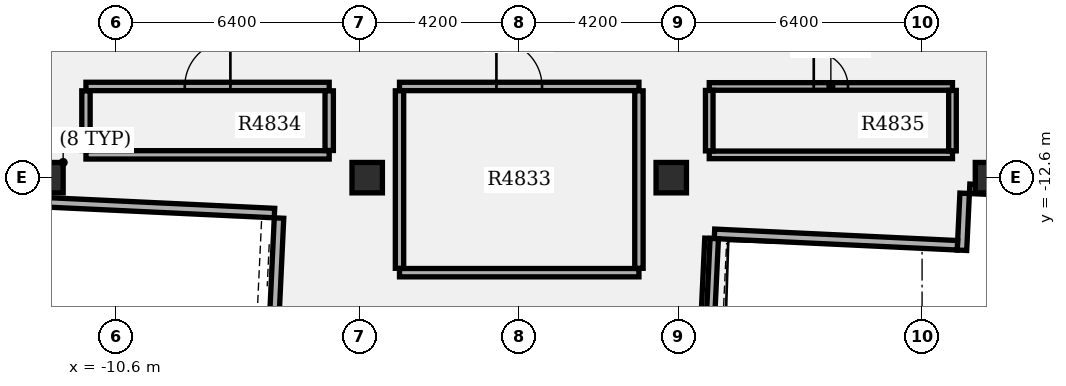
"""IFC4 building model, lengths in metres.
Left out: names, types, materials, properties, quantities, classifications, styles, units other than length and angle.
Written with IfcOpenShell. Run it as: python <this file> out.ifc"""

import sys

from ifc_helpers import new_model, si_unit, direction, frame, frame_2d, origin, origin_2d, place, context, subcontext, project, spatial, rectangle, extrude, element, fill, save


model = new_model("IFC4")
c1 = context("Model", 3, precision=1e-05, world=origin(), true_north=direction((0.0, 1.0)))
c2 = subcontext(c1, "Body", "Model", "MODEL_VIEW")
j1 = project(units=[si_unit("LENGTHUNIT", "METRE"), si_unit("PLANEANGLEUNIT", "RADIAN")], contexts=[c1])
p1 = place(None, origin())
s1 = spatial("IfcSite", under=j1, at=p1, CompositionType="ELEMENT")
p2 = place(p1, origin())
s2 = spatial("IfcBuilding", under=s1, at=p2, CompositionType="ELEMENT")
p3 = place(p2, frame((0.0, 0.0, 321.9)))
s3 = spatial("IfcBuildingStorey", under=s2, at=p3, CompositionType="ELEMENT", Elevation=321.9)
for number, where, z_axis, x_axis in (
    (1, (-12.4, -12.6, 0.0), (0.0, 0.0, 1.0), (1.0, 0.0, 0.0)),
    (2, (12.4, -12.6, 0.0), (0.0, 0.0, 1.0), (1.0, 0.0, 0.0)),
    (3, (-4.0, -12.6, 0.0), (0.0, 0.0, 1.0), (1.0, 0.0, 0.0)),
    (4, (4.0, -12.6, 0.0), (0.0, 0.0, 1.0), (1.0, 0.0, 0.0)),
):
    element("IfcColumn", number, at=place(p3, frame(where, z_axis=z_axis, x_axis=x_axis)), inside=s3, PredefinedType="COLUMN", context=c2, shape_type="SweptSolid", body=[
        extrude(rectangle(XDim=0.8, YDim=0.8, at=origin_2d()), origin(), (0.0, 0.0, 1.0), 5.2),
    ])
for number, where, z_axis, x_axis in (
    (5, (-6.321, -13.662, 0.0), (0.0, 0.0, 1.0), (-0.047, -0.999, 0.0)),
    (6, (4.889, -16.704, 0.0), (0.0, 0.0, 1.0), (0.047, 0.999, 0.0)),
):
    element("IfcWall", number, at=place(p3, frame(where, z_axis=z_axis, x_axis=x_axis)), inside=s3, PredefinedType="STANDARD", context=c2, shape_type="SweptSolid", body=[
        extrude(rectangle(XDim=2.51, YDim=0.25, at=frame_2d((1.255, 0.0))), origin(), (0.0, 0.0, 1.0), 3.6),
    ])
p4 = place(p3, frame((-12.833, -13.23, 0.0), z_axis=(0.0, 0.0, 1.0), x_axis=(0.998889611537, -0.04711203629, 0.0)))
e7 = element("IfcWall", 7, at=p4, inside=s3, PredefinedType="STANDARD", context=c2, shape_type="SweptSolid", body=[
    extrude(rectangle(XDim=6.4, YDim=0.25, at=frame_2d((3.2, 0.0))), origin(), (0.0, 0.0, 1.0), 3.6),
])
p5 = place(p3, frame((13.099, -12.951, 0.0), z_axis=(0.0, 0.0, 1.0), x_axis=(-0.99889143794, 0.047073296156, 0.0)))
e8 = element("IfcWall", 8, at=p5, inside=s3, PredefinedType="STANDARD", context=c2, shape_type="SweptSolid", body=[
    extrude(rectangle(XDim=1.25, YDim=0.25, at=frame_2d((0.625, 0.0))), origin(), (0.0, 0.0, 1.0), 3.6),
])
p6 = place(p3, frame((11.72, -13.011, 0.0), z_axis=(0.0, 0.0, 1.0), x_axis=(-0.047194015166, -0.99888574168, 0.0)))
e9 = element("IfcWall", 9, at=p6, inside=s3, PredefinedType="STANDARD", context=c2, shape_type="SweptSolid", body=[
    extrude(rectangle(XDim=1.5, YDim=0.25, at=frame_2d((0.75, 0.0))), origin(), (0.0, 0.0, 1.0), 3.6),
])
p7 = place(p3, frame((11.531, -14.379, 0.0), z_axis=(0.0, 0.0, 1.0), x_axis=(-0.998889611537, 0.04711203629, 0.0)))
e10 = element("IfcWall", 10, at=p7, inside=s3, PredefinedType="STANDARD", context=c2, shape_type="SweptSolid", body=[
    extrude(rectangle(XDim=6.4, YDim=0.25, at=frame_2d((3.2, 0.0))), origin(), (0.0, 0.0, 1.0), 3.6),
])
p8 = place(p3, frame((5.002, -16.959, 5.2), z_axis=(0.0, 0.0, 1.0), x_axis=(0.047056642383, 0.998892222618, 0.0)))
e11 = element("IfcWall", 11, at=p8, inside=s3, PredefinedType="PARAPET", context=c2, shape_type="SweptSolid", body=[
    extrude(rectangle(XDim=2.76, YDim=0.22, at=frame_2d((1.38, 0.0))), origin(), (0.0, 0.0, 1.0), 1.1),
])
p9 = place(p3, frame((-3.15, -15.1, 0.0), z_axis=(0.0, 0.0, 1.0), x_axis=(1.0, 0.0, 0.0)))
e12 = element("IfcWall", 12, at=p9, inside=s3, PredefinedType="PARTITIONING", context=c2, shape_type="SweptSolid", body=[
    extrude(rectangle(XDim=6.3, YDim=0.22, at=frame_2d((3.15, 0.0))), origin(), (0.0, 0.0, 1.0), 3.59),
])
p10 = place(p3, frame((-3.15, -10.2, 0.0), z_axis=(0.0, 0.0, 1.0), x_axis=(1.0, 0.0, 0.0)))
e13 = element("IfcWall", 13, at=p10, inside=s3, PredefinedType="PARTITIONING", context=c2, shape_type="SweptSolid", body=[
    extrude(rectangle(XDim=6.3, YDim=0.22, at=frame_2d((3.15, 0.0))), origin(), (0.0, 0.0, 1.0), 3.59),
])
p11 = place(p10, frame((2.55, 0.0, 0.0)))
e14 = element("IfcOpeningElement", 14, at=p11, cuts=e13, PredefinedType="OPENING", context=c2, shape_type="SweptSolid", body=[
    extrude(rectangle(XDim=1.2, YDim=2.15, at=frame_2d((0.6, 1.075))), frame((0.0, 0.12, 0.0), z_axis=(0.0, -1.0, 0.0), x_axis=(1.0, 0.0, 0.0)), (0.0, 0.0, 1.0), 0.24),
])
for number, where, z_axis, x_axis in (
    (15, (-3.15, -14.985, 0.0), (0.0, 0.0, 1.0), (0.0, 1.0, 0.0)),
    (16, (3.15, -14.985, 0.0), (0.0, 0.0, 1.0), (0.0, 1.0, 0.0)),
):
    element("IfcWall", number, at=place(p3, frame(where, z_axis=z_axis, x_axis=x_axis)), inside=s3, PredefinedType="PARTITIONING", context=c2, shape_type="SweptSolid", body=[
        extrude(rectangle(XDim=4.67, YDim=0.22, at=frame_2d((2.335, 0.0))), origin(), (0.0, 0.0, 1.0), 3.59),
    ])
p12 = place(p3, frame((-11.4, -12.0, 0.0), z_axis=(0.0, 0.0, 1.0), x_axis=(1.0, 0.0, 0.0)))
e17 = element("IfcWall", 17, at=p12, inside=s3, PredefinedType="PARTITIONING", context=c2, shape_type="SweptSolid", body=[
    extrude(rectangle(XDim=6.4, YDim=0.22, at=frame_2d((3.2, 0.0))), origin(), (0.0, 0.0, 1.0), 3.59),
])
p13 = place(p3, frame((-11.4, -10.2, 0.0), z_axis=(0.0, 0.0, 1.0), x_axis=(1.0, 0.0, 0.0)))
e18 = element("IfcWall", 18, at=p13, inside=s3, PredefinedType="PARTITIONING", context=c2, shape_type="SweptSolid", body=[
    extrude(rectangle(XDim=6.4, YDim=0.22, at=frame_2d((3.2, 0.0))), origin(), (0.0, 0.0, 1.0), 3.59),
])
p14 = place(p13, frame((2.6, 0.0, 0.0)))
e19 = element("IfcOpeningElement", 19, at=p14, cuts=e18, PredefinedType="OPENING", context=c2, shape_type="SweptSolid", body=[
    extrude(rectangle(XDim=1.2, YDim=2.15, at=frame_2d((0.6, 1.075))), frame((0.0, 0.12, 0.0), z_axis=(0.0, -1.0, 0.0), x_axis=(1.0, 0.0, 0.0)), (0.0, 0.0, 1.0), 0.24),
])
for number, where, z_axis, x_axis in (
    (20, (-11.4, -11.885, 0.0), (0.0, 0.0, 1.0), (0.0, 1.0, 0.0)),
    (21, (-5.0, -11.885, 0.0), (0.0, 0.0, 1.0), (0.0, 1.0, 0.0)),
):
    element("IfcWall", number, at=place(p3, frame(where, z_axis=z_axis, x_axis=x_axis)), inside=s3, PredefinedType="PARTITIONING", context=c2, shape_type="SweptSolid", body=[
        extrude(rectangle(XDim=1.57, YDim=0.22, at=frame_2d((0.785, 0.0))), origin(), (0.0, 0.0, 1.0), 3.59),
    ])
p15 = place(p3, frame((5.0, -12.0, 0.0), z_axis=(0.0, 0.0, 1.0), x_axis=(1.0, 0.0, 0.0)))
e22 = element("IfcWall", 22, at=p15, inside=s3, PredefinedType="PARTITIONING", context=c2, shape_type="SweptSolid", body=[
    extrude(rectangle(XDim=6.4, YDim=0.2, at=frame_2d((3.2, 0.0))), origin(), (0.0, 0.0, 1.0), 3.59),
])
p16 = place(p3, frame((5.0, -10.2, 0.0), z_axis=(0.0, 0.0, 1.0), x_axis=(1.0, 0.0, 0.0)))
e23 = element("IfcWall", 23, at=p16, inside=s3, PredefinedType="PARTITIONING", context=c2, shape_type="SweptSolid", body=[
    extrude(rectangle(XDim=6.4, YDim=0.2, at=frame_2d((3.2, 0.0))), origin(), (0.0, 0.0, 1.0), 3.59),
])
p17 = place(p16, frame((2.75, 0.0, 0.0)))
e24 = element("IfcOpeningElement", 24, at=p17, cuts=e23, PredefinedType="OPENING", context=c2, shape_type="SweptSolid", body=[
    extrude(rectangle(XDim=0.9, YDim=2.15, at=frame_2d((0.45, 1.075))), frame((0.0, 0.11, 0.0), z_axis=(0.0, -1.0, 0.0), x_axis=(1.0, 0.0, 0.0)), (0.0, 0.0, 1.0), 0.22),
])
for number, where, z_axis, x_axis in (
    (25, (5.0, -11.895, 0.0), (0.0, 0.0, 1.0), (0.0, 1.0, 0.0)),
    (26, (11.4, -11.895, 0.0), (0.0, 0.0, 1.0), (0.0, 1.0, 0.0)),
):
    element("IfcWall", number, at=place(p3, frame(where, z_axis=z_axis, x_axis=x_axis)), inside=s3, PredefinedType="PARTITIONING", context=c2, shape_type="SweptSolid", body=[
        extrude(rectangle(XDim=1.59, YDim=0.2, at=frame_2d((0.795, 0.0))), origin(), (0.0, 0.0, 1.0), 3.59),
    ])
p18 = place(p11, origin())
e27 = element("IfcDoor", 27, at=p18, inside=s3, OperationType="SINGLE_SWING_LEFT", PredefinedType="DOOR", context=c2, shape_type="SweptSolid", body=[
    extrude(rectangle(XDim=1.2, YDim=2.15, at=frame_2d((0.6, 1.075))), frame((0.0, 0.025, 0.0), z_axis=(0.0, -1.0, 0.0), x_axis=(1.0, 0.0, 0.0)), (0.0, 0.0, 1.0), 0.05),
])
fill(e14, e27)
p19 = place(p14, origin())
e28 = element("IfcDoor", 28, at=p19, inside=s3, OperationType="SINGLE_SWING_RIGHT", PredefinedType="DOOR", context=c2, shape_type="SweptSolid", body=[
    extrude(rectangle(XDim=1.2, YDim=2.15, at=frame_2d((0.6, 1.075))), frame((0.0, 0.025, 0.0), z_axis=(0.0, -1.0, 0.0), x_axis=(1.0, 0.0, 0.0)), (0.0, 0.0, 1.0), 0.05),
])
fill(e19, e28)
p20 = place(p17, origin())
e29 = element("IfcDoor", 29, at=p20, inside=s3, OperationType="SINGLE_SWING_LEFT", PredefinedType="DOOR", context=c2, shape_type="SweptSolid", body=[
    extrude(rectangle(XDim=0.9, YDim=2.15, at=frame_2d((0.45, 1.075))), frame((0.0, 0.025, 0.0), z_axis=(0.0, -1.0, 0.0), x_axis=(1.0, 0.0, 0.0)), (0.0, 0.0, 1.0), 0.05),
])
fill(e24, e29)
save(model, sys.argv[1])
